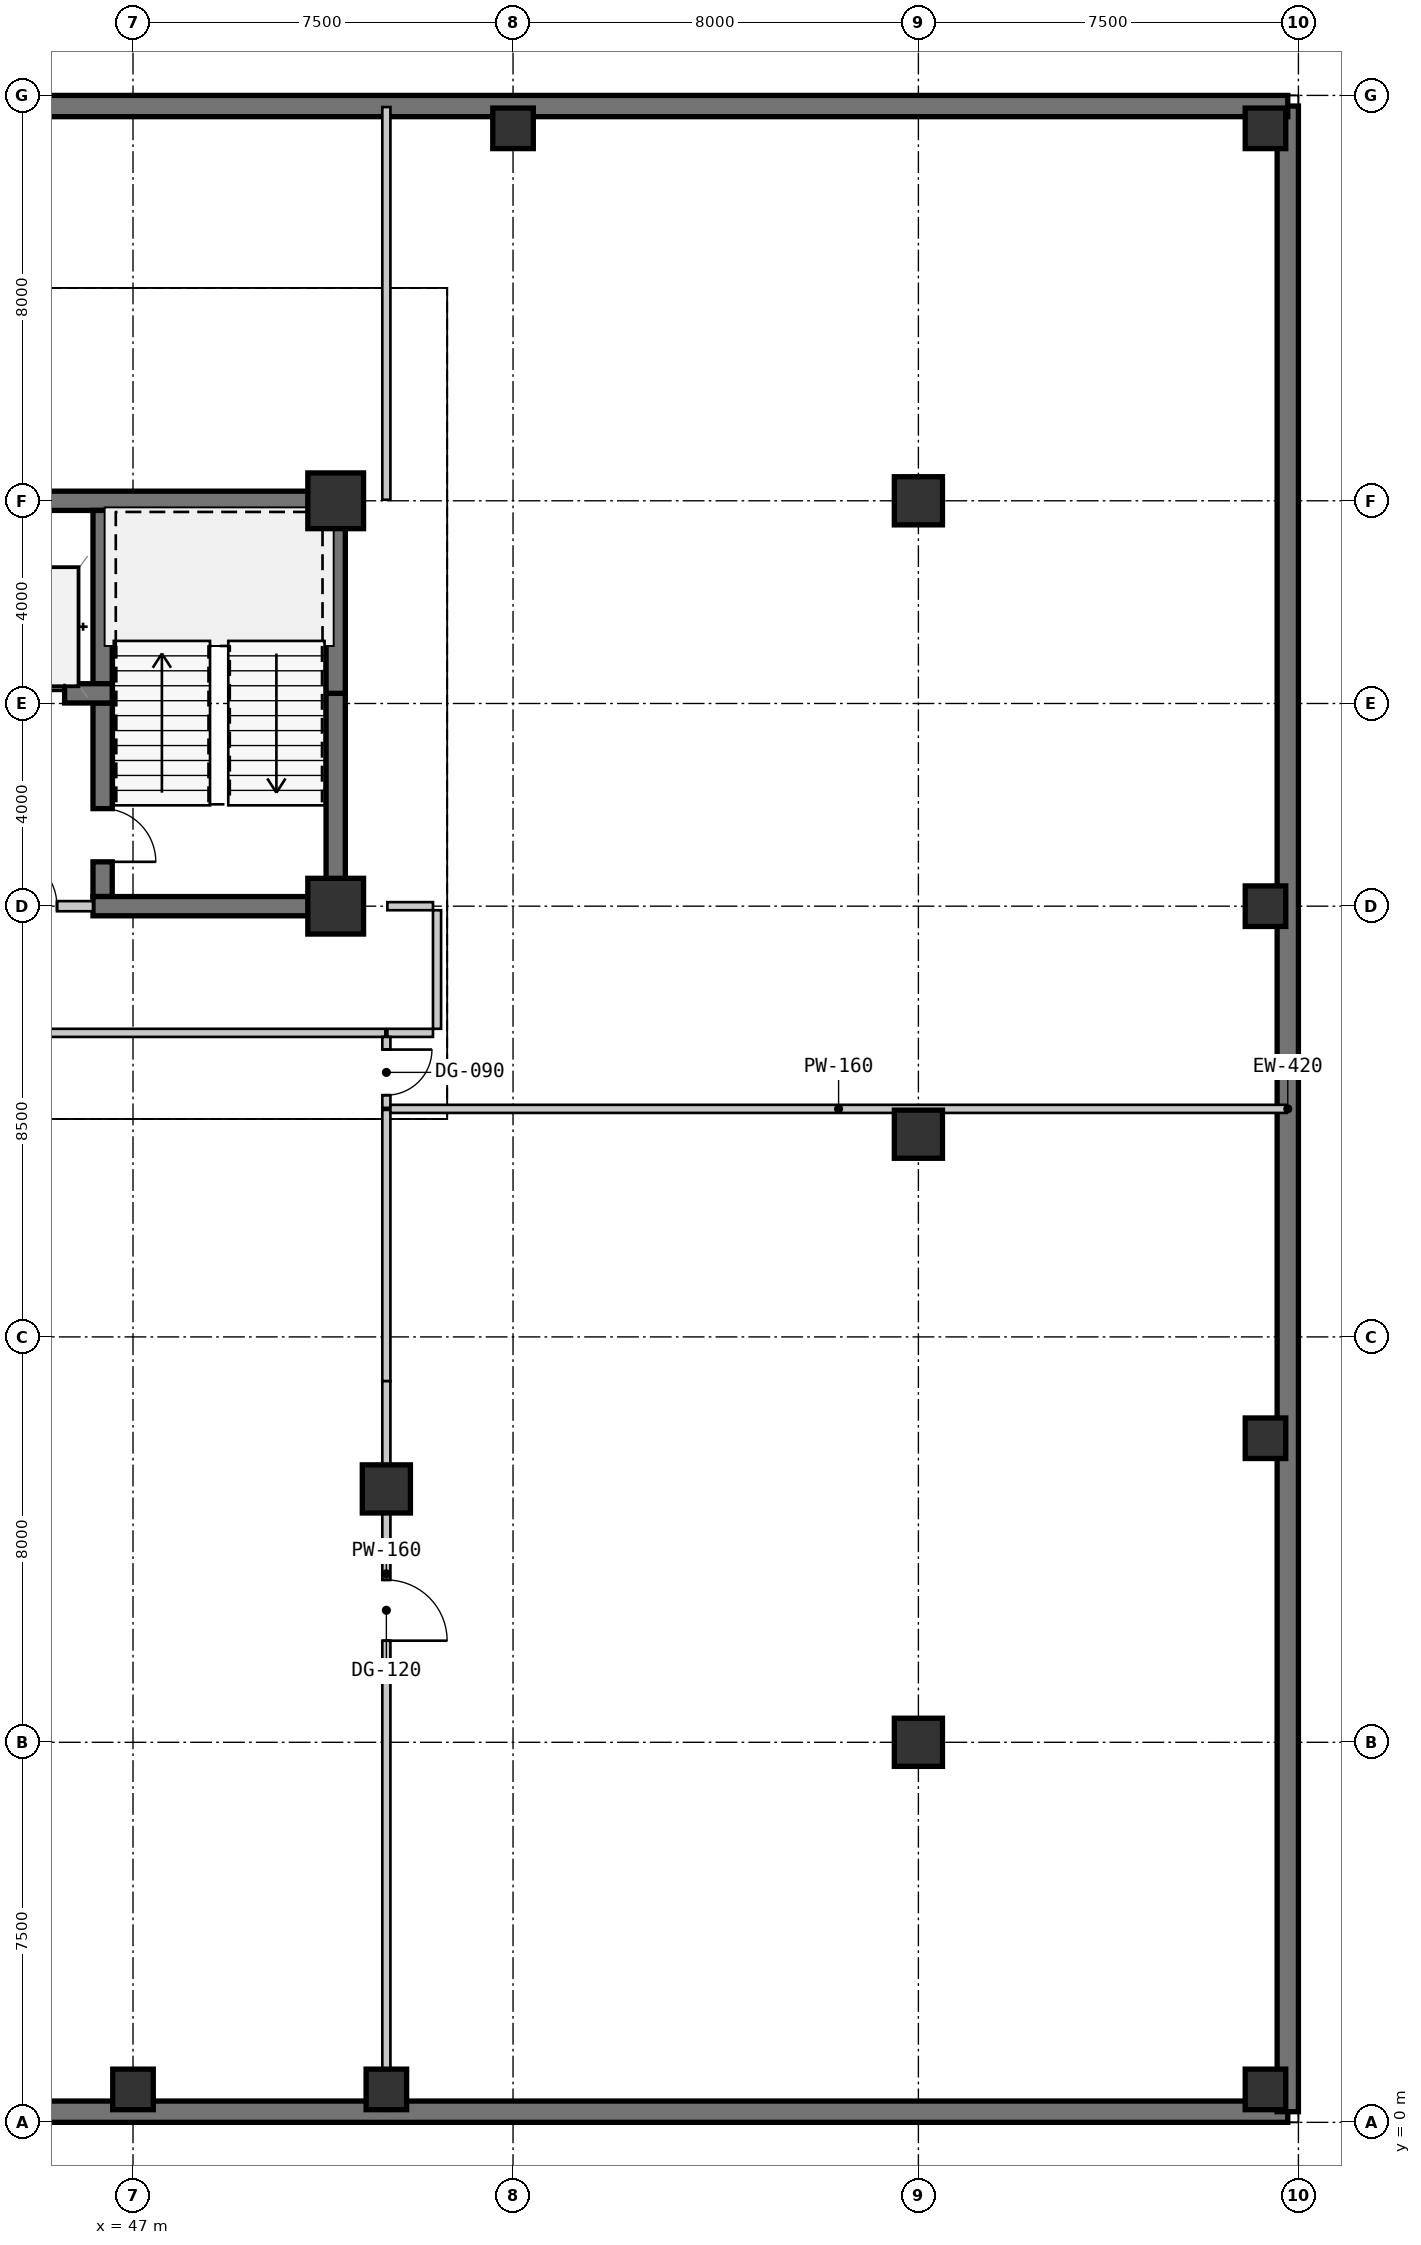
"""IFC4 building model, lengths in metres.
Left out: names, types, materials, properties, quantities, classifications, styles, units other than length and angle.
Written with IfcOpenShell. Run it as: python <this file> out.ifc"""

import sys

from ifc_helpers import new_model, si_unit, direction, frame, frame_2d, origin, origin_2d, place, context, subcontext, project, spatial, rectangle, extrude, source, transform, mapped, element, fill, save


model = new_model("IFC4")
c1 = context("Model", 3, precision=1e-05, world=origin(), true_north=direction((0.0, 1.0)))
c2 = subcontext(c1, "Body", "Model", "MODEL_VIEW")
j1 = project(units=[si_unit("LENGTHUNIT", "METRE"), si_unit("PLANEANGLEUNIT", "RADIAN")], contexts=[c1])
p1 = place(None, origin())
s1 = spatial("IfcSite", under=j1, at=p1, CompositionType="ELEMENT")
p2 = place(p1, origin())
s2 = spatial("IfcBuilding", under=s1, at=p2, CompositionType="ELEMENT")
p3 = place(p2, frame((0.0, 0.0, -8.0)))
s3 = spatial("IfcBuildingStorey", under=s2, at=p3, CompositionType="ELEMENT", Elevation=-8.0)
m1 = source(origin(), c2, "Body", "SweptSolid", [
    extrude(rectangle(XDim=1.1, YDim=1.1, at=origin_2d()), origin(), (0.0, 0.0, 1.0), 4.0),
])
for number, where, z_axis, x_axis in (
    (1, (51.0, 24.0, 0.0), (0.0, 0.0, 1.0), (1.0, 0.0, 0.0)),
    (2, (51.0, 32.0, 0.0), (0.0, 0.0, 1.0), (1.0, 0.0, 0.0)),
):
    element("IfcColumn", number, at=place(p3, frame(where, z_axis=z_axis, x_axis=x_axis)), inside=s3, PredefinedType="COLUMN", context=c2, shape_type="MappedRepresentation", body=[
        mapped(m1, transform((0.0, 0.0, 0.0), scale=1.0)),
    ])
m2 = source(origin(), c2, "Body", "SweptSolid", [
    extrude(rectangle(XDim=0.95, YDim=0.95, at=origin_2d()), origin(), (0.0, 0.0, 1.0), 4.0),
])
for number, where, z_axis, x_axis in (
    (3, (52.0, 12.5, 0.0), (0.0, 0.0, 1.0), (1.0, 0.0, 0.0)),
    (4, (62.5, 7.5, 0.0), (0.0, 0.0, 1.0), (1.0, 0.0, 0.0)),
    (5, (62.5, 19.5, 0.0), (0.0, 0.0, 1.0), (1.0, 0.0, 0.0)),
    (6, (62.5, 32.0, 0.0), (0.0, 0.0, 1.0), (1.0, 0.0, 0.0)),
):
    element("IfcColumn", number, at=place(p3, frame(where, z_axis=z_axis, x_axis=x_axis)), inside=s3, PredefinedType="COLUMN", context=c2, shape_type="MappedRepresentation", body=[
        mapped(m2, transform((0.0, 0.0, 0.0), scale=1.0)),
    ])
m3 = source(origin(), c2, "Body", "SweptSolid", [
    extrude(rectangle(XDim=0.8, YDim=0.8, at=origin_2d()), origin(), (0.0, 0.0, 1.0), 4.0),
])
for number, where, z_axis, x_axis in (
    (7, (69.35, 0.65, 0.0), (0.0, 0.0, 1.0), (1.0, 0.0, 0.0)),
    (8, (69.35, 13.5, 0.0), (0.0, 0.0, 1.0), (1.0, 0.0, 0.0)),
    (9, (69.35, 24.0, 0.0), (0.0, 0.0, 1.0), (1.0, 0.0, 0.0)),
    (10, (69.35, 39.35, 0.0), (0.0, 0.0, 1.0), (1.0, 0.0, 0.0)),
    (11, (47.0, 0.65, 0.0), (0.0, 0.0, 1.0), (1.0, 0.0, 0.0)),
    (12, (52.0, 0.65, 0.0), (0.0, 0.0, 1.0), (1.0, 0.0, 0.0)),
    (13, (54.5, 39.35, 0.0), (0.0, 0.0, 1.0), (1.0, 0.0, 0.0)),
):
    element("IfcColumn", number, at=place(p3, frame(where, z_axis=z_axis, x_axis=x_axis)), inside=s3, PredefinedType="COLUMN", context=c2, shape_type="MappedRepresentation", body=[
        mapped(m3, transform((0.0, 0.0, 0.0), scale=1.0)),
    ])
m4 = source(origin(), c2, "Body", "SweptSolid", [
    extrude(rectangle(XDim=69.58, YDim=0.42, at=frame_2d((34.79, 0.0))), origin(), (0.0, 0.0, 1.0), 3.72),
])
p4 = place(p3, frame((0.21, 0.21, 0.0), z_axis=(0.0, 0.0, 1.0), x_axis=(1.0, 0.0, 0.0)))
e14 = element("IfcWall", 14, at=p4, inside=s3, PredefinedType="SOLIDWALL", context=c2, shape_type="MappedRepresentation", body=[
    mapped(m4, transform((0.0, 0.0, 0.0), scale=1.0)),
])
m5 = source(origin(), c2, "Body", "SweptSolid", [
    extrude(rectangle(XDim=39.58, YDim=0.42, at=frame_2d((19.79, 0.0))), origin(), (0.0, 0.0, 1.0), 3.72),
])
p5 = place(p3, frame((69.79, 0.21, 0.0), z_axis=(0.0, 0.0, 1.0), x_axis=(0.0, 1.0, 0.0)))
e15 = element("IfcWall", 15, at=p5, inside=s3, PredefinedType="SOLIDWALL", context=c2, shape_type="MappedRepresentation", body=[
    mapped(m5, transform((0.0, 0.0, 0.0), scale=1.0)),
])
p6 = place(p3, frame((69.79, 39.79, 0.0), z_axis=(0.0, 0.0, 1.0), x_axis=(-1.0, 0.0, 0.0)))
e16 = element("IfcWall", 16, at=p6, inside=s3, PredefinedType="SOLIDWALL", context=c2, shape_type="MappedRepresentation", body=[
    mapped(m4, transform((0.0, 0.0, 0.0), scale=1.0)),
])
m6 = source(origin(), c2, "Body", "SweptSolid", [
    extrude(rectangle(XDim=11.99, YDim=0.38, at=frame_2d((5.995, 0.0))), origin(), (0.0, 0.0, 1.0), 3.72),
])
p7 = place(p3, frame((39.2, 32.0, 0.0), z_axis=(0.0, 0.0, 1.0), x_axis=(1.0, 0.0, 0.0)))
e17 = element("IfcWall", 17, at=p7, inside=s3, PredefinedType="SHEAR", context=c2, shape_type="MappedRepresentation", body=[
    mapped(m6, transform((0.0, 0.0, 0.0), scale=1.0)),
])
m7 = source(origin(), c2, "Body", "SweptSolid", [
    extrude(rectangle(XDim=4.01, YDim=0.38, at=frame_2d((2.005, 0.0))), origin(), (0.0, 0.0, 1.0), 3.72),
])
p8 = place(p3, frame((51.0, 24.19, 0.0), z_axis=(0.0, 0.0, 1.0), x_axis=(0.0, 1.0, 0.0)))
e18 = element("IfcWall", 18, at=p8, inside=s3, PredefinedType="SHEAR", context=c2, shape_type="MappedRepresentation", body=[
    mapped(m7, transform((0.0, 0.0, 0.0), scale=1.0)),
])
m8 = source(origin(), c2, "Body", "SweptSolid", [
    extrude(rectangle(XDim=3.61, YDim=0.38, at=frame_2d((1.805, 0.0))), origin(), (0.0, 0.0, 1.0), 3.72),
])
p9 = place(p3, frame((51.0, 28.2, 0.0), z_axis=(0.0, 0.0, 1.0), x_axis=(0.0, 1.0, 0.0)))
e19 = element("IfcWall", 19, at=p9, inside=s3, PredefinedType="SHEAR", context=c2, shape_type="MappedRepresentation", body=[
    mapped(m8, transform((0.0, 0.0, 0.0), scale=1.0)),
])
m9 = source(origin(), c2, "Body", "SweptSolid", [
    extrude(rectangle(XDim=3.42, YDim=0.38, at=frame_2d((1.71, 0.0))), origin(), (0.0, 0.0, 1.0), 3.72),
])
p10 = place(p3, frame((46.4, 31.81, 0.0), z_axis=(0.0, 0.0, 1.0), x_axis=(0.0, -1.0, 0.0)))
e20 = element("IfcWall", 20, at=p10, inside=s3, PredefinedType="SHEAR", context=c2, shape_type="MappedRepresentation", body=[
    mapped(m9, transform((0.0, 0.0, 0.0), scale=1.0)),
])
m10 = source(origin(), c2, "Body", "SweptSolid", [
    extrude(rectangle(XDim=3.82, YDim=0.38, at=frame_2d((1.91, 0.0))), origin(), (0.0, 0.0, 1.0), 3.72),
])
p11 = place(p3, frame((46.4, 28.01, 0.0), z_axis=(0.0, 0.0, 1.0), x_axis=(0.0, -1.0, 0.0)))
e21 = element("IfcWall", 21, at=p11, inside=s3, PredefinedType="SHEAR", context=c2, shape_type="MappedRepresentation", body=[
    mapped(m10, transform((0.0, 0.0, 0.0), scale=1.0)),
])
m11 = source(origin(), c2, "Body", "SweptSolid", [
    extrude(rectangle(XDim=1.05, YDim=2.1, at=frame_2d((0.525, 1.05))), frame((0.0, 0.2, 0.0), z_axis=(0.0, -1.0, 0.0), x_axis=(1.0, 0.0, 0.0)), (0.0, 0.0, 1.0), 0.4),
])
p12 = place(p11, frame((2.085, 0.0, 0.0)))
e22 = element("IfcOpeningElement", 22, at=p12, cuts=e21, PredefinedType="OPENING", context=c2, shape_type="MappedRepresentation", body=[
    mapped(m11, transform((0.0, 0.0, 0.0), scale=1.0)),
])
m12 = source(origin(), c2, "Body", "SweptSolid", [
    extrude(rectangle(XDim=4.98, YDim=0.38, at=frame_2d((2.49, 0.0))), origin(), (0.0, 0.0, 1.0), 3.72),
])
p13 = place(p3, frame((46.21, 24.0, 0.0), z_axis=(0.0, 0.0, 1.0), x_axis=(1.0, 0.0, 0.0)))
e23 = element("IfcWall", 23, at=p13, inside=s3, PredefinedType="SHEAR", context=c2, shape_type="MappedRepresentation", body=[
    mapped(m12, transform((0.0, 0.0, 0.0), scale=1.0)),
])
m13 = source(origin(), c2, "Body", "SweptSolid", [
    extrude(rectangle(XDim=2.98, YDim=0.38, at=frame_2d((1.49, 0.0))), origin(), (0.0, 0.0, 1.0), 3.72),
])
p14 = place(p3, frame((43.61, 28.2, 0.0), z_axis=(0.0, 0.0, 1.0), x_axis=(1.0, 0.0, 0.0)))
e24 = element("IfcWall", 24, at=p14, inside=s3, PredefinedType="SHEAR", context=c2, shape_type="MappedRepresentation", body=[
    mapped(m13, transform((0.0, 0.0, 0.0), scale=1.0)),
])
m14 = source(origin(), c2, "Body", "SweptSolid", [
    extrude(rectangle(XDim=1.1, YDim=2.15, at=frame_2d((0.55, 1.075))), frame((0.0, 0.2, 0.0), z_axis=(0.0, -1.0, 0.0), x_axis=(1.0, 0.0, 0.0)), (0.0, 0.0, 1.0), 0.4),
])
p15 = place(p14, frame((0.94, 0.0, 0.0)))
e25 = element("IfcOpeningElement", 25, at=p15, cuts=e24, PredefinedType="OPENING", context=c2, shape_type="MappedRepresentation", body=[
    mapped(m14, transform((0.0, 0.0, 0.0), scale=1.0)),
])
m15 = source(origin(), c2, "Body", "SweptSolid", [
    extrude(rectangle(XDim=2.66, YDim=0.2, at=frame_2d((1.33, 0.0))), origin(), (0.0, 0.0, 1.0), 3.187),
])
p16 = place(p3, frame((43.55, 24.0, 0.0), z_axis=(0.0, 0.0, 1.0), x_axis=(1.0, 0.0, 0.0)))
e26 = element("IfcWall", 26, at=p16, inside=s3, PredefinedType="SOLIDWALL", context=c2, shape_type="MappedRepresentation", body=[
    mapped(m15, transform((0.0, 0.0, 0.0), scale=1.0)),
])
m16 = source(origin(), c2, "Body", "SweptSolid", [
    extrude(rectangle(XDim=1.05, YDim=2.1, at=frame_2d((0.525, 1.05))), frame((0.0, 0.11, 0.0), z_axis=(0.0, -1.0, 0.0), x_axis=(1.0, 0.0, 0.0)), (0.0, 0.0, 1.0), 0.22),
])
p17 = place(p16, frame((0.9, 0.0, 0.0)))
e27 = element("IfcOpeningElement", 27, at=p17, cuts=e26, PredefinedType="OPENING", context=c2, shape_type="MappedRepresentation", body=[
    mapped(m16, transform((0.0, 0.0, 0.0), scale=1.0)),
])
m17 = source(origin(), c2, "Body", "SweptSolid", [
    extrude(rectangle(XDim=36.959, YDim=0.16, at=frame_2d((18.48, 0.0))), origin(), (0.0, 0.0, 1.0), 3.72),
])
p18 = place(p3, frame((51.98, 21.5, 0.0), z_axis=(0.0, 0.0, 1.0), x_axis=(-1.0, 0.0, 0.0)))
e28 = element("IfcWall", 28, at=p18, inside=s3, PredefinedType="PARTITIONING", context=c2, shape_type="MappedRepresentation", body=[
    mapped(m17, transform((0.0, 0.0, 0.0), scale=1.0)),
])
m18 = source(origin(), c2, "Body", "SweptSolid", [
    extrude(rectangle(XDim=1.05, YDim=2.1, at=frame_2d((0.525, 1.05))), frame((0.0, 0.09, 0.0), z_axis=(0.0, -1.0, 0.0), x_axis=(1.0, 0.0, 0.0)), (0.0, 0.0, 1.0), 0.18),
])
p19 = place(p18, frame((17.955, 0.0, 0.0)))
e29 = element("IfcOpeningElement", 29, at=p19, cuts=e28, PredefinedType="OPENING", context=c2, shape_type="MappedRepresentation", body=[
    mapped(m18, transform((0.0, 0.0, 0.0), scale=1.0)),
])
m19 = source(origin(), c2, "Body", "SweptSolid", [
    extrude(rectangle(XDim=2.34, YDim=0.16, at=frame_2d((1.17, 0.0))), origin(), (0.0, 0.0, 1.0), 3.72),
])
p20 = place(p3, frame((53.0, 23.92, 0.0), z_axis=(0.0, 0.0, 1.0), x_axis=(0.0, -1.0, 0.0)))
e30 = element("IfcWall", 30, at=p20, inside=s3, PredefinedType="PARTITIONING", context=c2, shape_type="MappedRepresentation", body=[
    mapped(m19, transform((0.0, 0.0, 0.0), scale=1.0)),
])
m20 = source(origin(), c2, "Body", "SweptSolid", [
    extrude(rectangle(XDim=0.9, YDim=0.16, at=frame_2d((0.45, 0.0))), origin(), (0.0, 0.0, 1.0), 3.72),
])
for number, where, z_axis, x_axis in (
    (31, (52.92, 21.5, 0.0), (0.0, 0.0, 1.0), (-1.0, 0.0, 0.0)),
    (32, (52.02, 24.0, 0.0), (0.0, 0.0, 1.0), (1.0, 0.0, 0.0)),
):
    element("IfcWall", number, at=place(p3, frame(where, z_axis=z_axis, x_axis=x_axis)), inside=s3, PredefinedType="PARTITIONING", context=c2, shape_type="MappedRepresentation", body=[
        mapped(m20, transform((0.0, 0.0, 0.0), scale=1.0)),
    ])
m21 = source(origin(), c2, "Body", "SweptSolid", [
    extrude(rectangle(XDim=5.354, YDim=0.16, at=frame_2d((2.677, 0.0))), origin(), (0.0, 0.0, 1.0), 3.72),
])
p21 = place(p3, frame((52.0, 19.98, 0.0), z_axis=(0.0, 0.0, 1.0), x_axis=(0.0, -1.0, 0.0)))
e33 = element("IfcWall", 33, at=p21, inside=s3, PredefinedType="PARTITIONING", context=c2, shape_type="MappedRepresentation", body=[
    mapped(m21, transform((0.0, 0.0, 0.0), scale=1.0)),
])
m22 = source(origin(), c2, "Body", "SweptSolid", [
    extrude(rectangle(XDim=13.976, YDim=0.16, at=frame_2d((6.988, 0.0))), origin(), (0.0, 0.0, 1.0), 3.187),
])
p22 = place(p3, frame((52.0, 14.626, 0.0), z_axis=(0.0, 0.0, 1.0), x_axis=(0.0, -1.0, 0.0)))
e34 = element("IfcWall", 34, at=p22, inside=s3, PredefinedType="PARTITIONING", context=c2, shape_type="MappedRepresentation", body=[
    mapped(m22, transform((0.0, 0.0, 0.0), scale=1.0)),
])
m23 = source(origin(), c2, "Body", "SweptSolid", [
    extrude(rectangle(XDim=1.2, YDim=2.1, at=frame_2d((0.6, 1.05))), frame((0.0, 0.09, 0.0), z_axis=(0.0, -1.0, 0.0), x_axis=(1.0, 0.0, 0.0)), (0.0, 0.0, 1.0), 0.18),
])
p23 = place(p22, frame((3.921, 0.0, 0.0)))
e35 = element("IfcOpeningElement", 35, at=p23, cuts=e34, PredefinedType="OPENING", context=c2, shape_type="MappedRepresentation", body=[
    mapped(m23, transform((0.0, 0.0, 0.0), scale=1.0)),
])
m24 = source(origin(), c2, "Body", "SweptSolid", [
    extrude(rectangle(XDim=0.42, YDim=0.16, at=frame_2d((0.21, 0.0))), origin(), (0.0, 0.0, 1.0), 3.72),
])
p24 = place(p3, frame((52.0, 0.65, 0.0), z_axis=(0.0, 0.0, 1.0), x_axis=(0.0, -1.0, 0.0)))
e36 = element("IfcWall", 36, at=p24, inside=s3, PredefinedType="PARTITIONING", context=c2, shape_type="MappedRepresentation", body=[
    mapped(m24, transform((0.0, 0.0, 0.0), scale=1.0)),
])
m25 = source(origin(), c2, "Body", "SweptSolid", [
    extrude(rectangle(XDim=1.4, YDim=0.16, at=frame_2d((0.7, 0.0))), origin(), (0.0, 0.0, 1.0), 3.72),
])
p25 = place(p3, frame((52.0, 21.42, 0.0), z_axis=(0.0, 0.0, 1.0), x_axis=(0.0, -1.0, 0.0)))
e37 = element("IfcWall", 37, at=p25, inside=s3, PredefinedType="PARTITIONING", context=c2, shape_type="MappedRepresentation", body=[
    mapped(m25, transform((0.0, 0.0, 0.0), scale=1.0)),
])
m26 = source(origin(), c2, "Body", "SweptSolid", [
    extrude(rectangle(XDim=0.9, YDim=2.1, at=frame_2d((0.45, 1.05))), frame((0.0, 0.09, 0.0), z_axis=(0.0, -1.0, 0.0), x_axis=(1.0, 0.0, 0.0)), (0.0, 0.0, 1.0), 0.18),
])
p26 = place(p25, frame((0.25, 0.0, 0.0)))
e38 = element("IfcOpeningElement", 38, at=p26, cuts=e37, PredefinedType="OPENING", context=c2, shape_type="MappedRepresentation", body=[
    mapped(m26, transform((0.0, 0.0, 0.0), scale=1.0)),
])
m27 = source(origin(), c2, "Body", "SweptSolid", [
    extrude(rectangle(XDim=17.69, YDim=0.16, at=frame_2d((8.845, 0.0))), origin(), (0.0, 0.0, 1.0), 3.72),
])
p27 = place(p3, frame((52.08, 20.0, 0.0), z_axis=(0.0, 0.0, 1.0), x_axis=(1.0, 0.0, 0.0)))
e39 = element("IfcWall", 39, at=p27, inside=s3, PredefinedType="PARTITIONING", context=c2, shape_type="MappedRepresentation", body=[
    mapped(m27, transform((0.0, 0.0, 0.0), scale=1.0)),
])
m28 = source(origin(), c2, "Body", "SweptSolid", [
    extrude(rectangle(XDim=7.75, YDim=0.16, at=frame_2d((3.875, 0.0))), origin(), (0.0, 0.0, 1.0), 3.72),
])
p28 = place(p3, frame((52.0, 32.02, 0.0), z_axis=(0.0, 0.0, 1.0), x_axis=(0.0, 1.0, 0.0)))
e40 = element("IfcWall", 40, at=p28, inside=s3, PredefinedType="PARTITIONING", context=c2, shape_type="MappedRepresentation", body=[
    mapped(m28, transform((0.0, 0.0, 0.0), scale=1.0)),
])
m29 = source(origin(), c2, "Body", "SweptSolid", [
    extrude(rectangle(XDim=1.05, YDim=2.1, at=frame_2d((0.525, 1.05))), frame((0.0, 0.025, 0.0), z_axis=(0.0, -1.0, 0.0), x_axis=(1.0, 0.0, 0.0)), (0.0, 0.0, 1.0), 0.05),
])
p29 = place(p12, origin())
e41 = element("IfcDoor", 41, at=p29, inside=s3, OperationType="SINGLE_SWING_RIGHT", PredefinedType="DOOR", context=c2, shape_type="MappedRepresentation", body=[
    mapped(m29, transform((0.0, 0.0, 0.0), scale=1.0)),
])
fill(e22, e41)
m30 = source(origin(), c2, "Body", "SweptSolid", [
    extrude(rectangle(XDim=1.1, YDim=2.15, at=frame_2d((0.55, 1.075))), frame((0.0, 0.025, 0.0), z_axis=(0.0, -1.0, 0.0), x_axis=(1.0, 0.0, 0.0)), (0.0, 0.0, 1.0), 0.05),
])
p30 = place(p15, origin())
e42 = element("IfcDoor", 42, at=p30, inside=s3, OperationType="SLIDING_TO_LEFT", PredefinedType="DOOR", context=c2, shape_type="MappedRepresentation", body=[
    mapped(m30, transform((0.0, 0.0, 0.0), scale=1.0)),
])
fill(e25, e42)
p31 = place(p17, origin())
e43 = element("IfcDoor", 43, at=p31, inside=s3, OperationType="SINGLE_SWING_LEFT", PredefinedType="DOOR", context=c2, shape_type="MappedRepresentation", body=[
    mapped(m29, transform((0.0, 0.0, 0.0), scale=1.0)),
])
fill(e27, e43)
m31 = source(origin(), c2, "Body", "SweptSolid", [
    extrude(rectangle(XDim=1.2, YDim=2.1, at=frame_2d((0.6, 1.05))), frame((0.0, 0.025, 0.0), z_axis=(0.0, -1.0, 0.0), x_axis=(1.0, 0.0, 0.0)), (0.0, 0.0, 1.0), 0.05),
])
p32 = place(p23, origin())
e44 = element("IfcDoor", 44, at=p32, inside=s3, OperationType="SINGLE_SWING_RIGHT", PredefinedType="GATE", context=c2, shape_type="MappedRepresentation", body=[
    mapped(m31, transform((0.0, 0.0, 0.0), scale=1.0)),
])
fill(e35, e44)
m32 = source(origin(), c2, "Body", "SweptSolid", [
    extrude(rectangle(XDim=0.9, YDim=2.1, at=frame_2d((0.45, 1.05))), frame((0.0, 0.025, 0.0), z_axis=(0.0, -1.0, 0.0), x_axis=(1.0, 0.0, 0.0)), (0.0, 0.0, 1.0), 0.05),
])
p33 = place(p26, origin())
e45 = element("IfcDoor", 45, at=p33, inside=s3, OperationType="SINGLE_SWING_LEFT", PredefinedType="GATE", context=c2, shape_type="MappedRepresentation", body=[
    mapped(m32, transform((0.0, 0.0, 0.0), scale=1.0)),
])
fill(e38, e45)
save(model, sys.argv[1])
